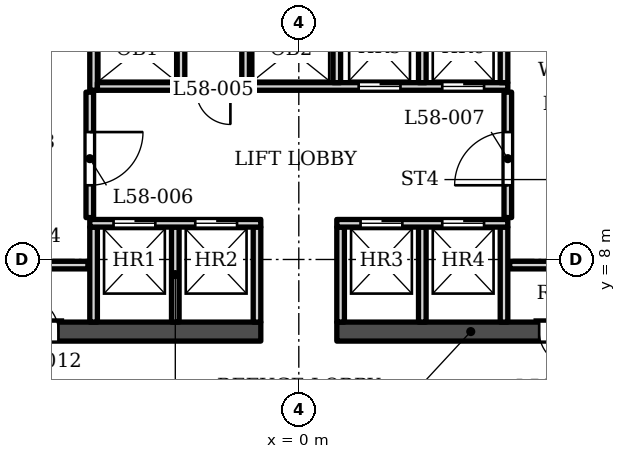
"""IFC4 building model, lengths in metres.
Left out: names, types, materials, properties, quantities, classifications, styles, units other than length and angle.
Written with IfcOpenShell. Run it as: python <this file> out.ifc"""

import sys

from ifc_helpers import new_model, si_unit, direction, frame, frame_2d, origin, place, context, subcontext, project, spatial, rectangle, extrude, element, fill, save


model = new_model("IFC4")
c1 = context("Model", 3, precision=1e-05, world=origin(), true_north=direction((0.0, 1.0)))
c2 = subcontext(c1, "Body", "Model", "MODEL_VIEW")
j1 = project(units=[si_unit("LENGTHUNIT", "METRE"), si_unit("PLANEANGLEUNIT", "RADIAN")], contexts=[c1])
p1 = place(None, origin())
s1 = spatial("IfcSite", under=j1, at=p1, CompositionType="ELEMENT")
p2 = place(p1, origin())
s2 = spatial("IfcBuilding", under=s1, at=p2, CompositionType="ELEMENT")
p3 = place(p2, frame((0.0, 0.0, 243.2)))
s3 = spatial("IfcBuildingStorey", under=s2, at=p3, CompositionType="ELEMENT", Elevation=243.2)
p4 = place(p3, frame((-8.05, 6.103, 0.0), z_axis=(0.0, 0.0, 1.0), x_axis=(1.0, 0.0, 0.0)))
e1 = element("IfcWall", 1, at=p4, inside=s3, PredefinedType="SHEAR", context=c2, shape_type="SweptSolid", body=[
    extrude(rectangle(XDim=7.05, YDim=0.5, at=frame_2d((3.525, 0.0))), origin(), (0.0, 0.0, 1.0), 5.0),
])
p5 = place(p4, frame((0.825, 0.0, 0.0)))
e2 = element("IfcOpeningElement", 2, at=p5, cuts=e1, PredefinedType="OPENING", context=c2, shape_type="SweptSolid", body=[
    extrude(rectangle(XDim=0.9, YDim=2.1, at=frame_2d((0.45, 1.05))), frame((0.0, 0.26, 0.0), z_axis=(0.0, -1.0, 0.0), x_axis=(1.0, 0.0, 0.0)), (0.0, 0.0, 1.0), 0.52),
])
p6 = place(p3, frame((1.0, 6.103, 0.0), z_axis=(0.0, 0.0, 1.0), x_axis=(1.0, 0.0, 0.0)))
e3 = element("IfcWall", 3, at=p6, inside=s3, PredefinedType="SHEAR", context=c2, shape_type="SweptSolid", body=[
    extrude(rectangle(XDim=7.05, YDim=0.5, at=frame_2d((3.525, 0.0))), origin(), (0.0, 0.0, 1.0), 5.0),
])
p7 = place(p6, frame((5.325, 0.0, 0.0)))
e4 = element("IfcOpeningElement", 4, at=p7, cuts=e3, PredefinedType="OPENING", context=c2, shape_type="SweptSolid", body=[
    extrude(rectangle(XDim=0.9, YDim=2.1, at=frame_2d((0.45, 1.05))), frame((0.0, 0.26, 0.0), z_axis=(0.0, -1.0, 0.0), x_axis=(1.0, 0.0, 0.0)), (0.0, 0.0, 1.0), 0.52),
])
for number, where, z_axis, x_axis in (
    (5, (-5.4, 6.353, 0.0), (0.0, 0.0, 1.0), (0.0, 1.0, 0.0)),
    (6, (-3.25, 6.353, 0.0), (0.0, 0.0, 1.0), (0.0, 1.0, 0.0)),
    (7, (-1.1, 6.353, 0.0), (0.0, 0.0, 1.0), (0.0, 1.0, 0.0)),
    (8, (1.1, 6.353, 0.0), (0.0, 0.0, 1.0), (0.0, 1.0, 0.0)),
    (9, (3.25, 6.353, 0.0), (0.0, 0.0, 1.0), (0.0, 1.0, 0.0)),
    (10, (5.4, 6.353, 0.0), (0.0, 0.0, 1.0), (0.0, 1.0, 0.0)),
    (11, (-8.05, 7.853, 0.0), (0.0, 0.0, 1.0), (1.0, 0.0, 0.0)),
    (12, (5.55, 7.853, 0.0), (0.0, 0.0, 1.0), (1.0, 0.0, 0.0)),
):
    element("IfcWall", number, at=place(p3, frame(where, z_axis=z_axis, x_axis=x_axis)), inside=s3, PredefinedType="SOLIDWALL", context=c2, shape_type="SweptSolid", body=[
        extrude(rectangle(XDim=2.5, YDim=0.2, at=frame_2d((1.25, 0.0))), origin(), (0.0, 0.0, 1.0), 4.83),
    ])
p8 = place(p3, frame((-5.5, 8.953, 0.0), z_axis=(0.0, 0.0, 1.0), x_axis=(1.0, 0.0, 0.0)))
e13 = element("IfcWall", 13, at=p8, inside=s3, PredefinedType="SOLIDWALL", context=c2, shape_type="SweptSolid", body=[
    extrude(rectangle(XDim=4.5, YDim=0.2, at=frame_2d((2.25, 0.0))), origin(), (0.0, 0.0, 1.0), 4.83),
])
p9 = place(p8, frame((0.625, 0.0, 0.0)))
e14 = element("IfcOpeningElement", 14, at=p9, cuts=e13, PredefinedType="OPENING", context=c2, shape_type="SweptSolid", body=[
    extrude(rectangle(XDim=1.1, YDim=2.1, at=frame_2d((0.55, 1.05))), frame((0.0, 0.11, 0.0), z_axis=(0.0, -1.0, 0.0), x_axis=(1.0, 0.0, 0.0)), (0.0, 0.0, 1.0), 0.22),
])
p10 = place(p8, frame((2.775, 0.0, 0.0)))
e15 = element("IfcOpeningElement", 15, at=p10, cuts=e13, PredefinedType="OPENING", context=c2, shape_type="SweptSolid", body=[
    extrude(rectangle(XDim=1.1, YDim=2.1, at=frame_2d((0.55, 1.05))), frame((0.0, 0.11, 0.0), z_axis=(0.0, -1.0, 0.0), x_axis=(1.0, 0.0, 0.0)), (0.0, 0.0, 1.0), 0.22),
])
p11 = place(p3, frame((1.0, 8.953, 0.0), z_axis=(0.0, 0.0, 1.0), x_axis=(1.0, 0.0, 0.0)))
e16 = element("IfcWall", 16, at=p11, inside=s3, PredefinedType="SOLIDWALL", context=c2, shape_type="SweptSolid", body=[
    extrude(rectangle(XDim=4.5, YDim=0.2, at=frame_2d((2.25, 0.0))), origin(), (0.0, 0.0, 1.0), 4.83),
])
p12 = place(p11, frame((0.625, 0.0, 0.0)))
e17 = element("IfcOpeningElement", 17, at=p12, cuts=e16, PredefinedType="OPENING", context=c2, shape_type="SweptSolid", body=[
    extrude(rectangle(XDim=1.1, YDim=2.1, at=frame_2d((0.55, 1.05))), frame((0.0, 0.11, 0.0), z_axis=(0.0, -1.0, 0.0), x_axis=(1.0, 0.0, 0.0)), (0.0, 0.0, 1.0), 0.22),
])
p13 = place(p11, frame((2.775, 0.0, 0.0)))
e18 = element("IfcOpeningElement", 18, at=p13, cuts=e16, PredefinedType="OPENING", context=c2, shape_type="SweptSolid", body=[
    extrude(rectangle(XDim=1.1, YDim=2.1, at=frame_2d((0.55, 1.05))), frame((0.0, 0.11, 0.0), z_axis=(0.0, -1.0, 0.0), x_axis=(1.0, 0.0, 0.0)), (0.0, 0.0, 1.0), 0.22),
])
p14 = place(p3, frame((-5.5, 9.103, 0.0), z_axis=(0.0, 0.0, 1.0), x_axis=(0.0, 1.0, 0.0)))
e19 = element("IfcWall", 19, at=p14, inside=s3, PredefinedType="SOLIDWALL", context=c2, shape_type="SweptSolid", body=[
    extrude(rectangle(XDim=3.3, YDim=0.2, at=frame_2d((1.65, 0.0))), origin(), (0.0, 0.0, 1.0), 4.83),
])
p15 = place(p14, frame((0.85, 0.0, 0.0)))
e20 = element("IfcOpeningElement", 20, at=p15, cuts=e19, PredefinedType="OPENING", context=c2, shape_type="SweptSolid", body=[
    extrude(rectangle(XDim=1.4, YDim=2.1, at=frame_2d((0.7, 1.05))), frame((0.0, 0.11, 0.0), z_axis=(0.0, -1.0, 0.0), x_axis=(1.0, 0.0, 0.0)), (0.0, 0.0, 1.0), 0.22),
])
p16 = place(p3, frame((5.5, 9.103, 0.0), z_axis=(0.0, 0.0, 1.0), x_axis=(0.0, 1.0, 0.0)))
e21 = element("IfcWall", 21, at=p16, inside=s3, PredefinedType="SOLIDWALL", context=c2, shape_type="SweptSolid", body=[
    extrude(rectangle(XDim=3.3, YDim=0.2, at=frame_2d((1.65, 0.0))), origin(), (0.0, 0.0, 1.0), 4.83),
])
p17 = place(p16, frame((0.85, 0.0, 0.0)))
e22 = element("IfcOpeningElement", 22, at=p17, cuts=e21, PredefinedType="OPENING", context=c2, shape_type="SweptSolid", body=[
    extrude(rectangle(XDim=1.4, YDim=2.1, at=frame_2d((0.7, 1.05))), frame((0.0, 0.11, 0.0), z_axis=(0.0, -1.0, 0.0), x_axis=(1.0, 0.0, 0.0)), (0.0, 0.0, 1.0), 0.22),
])
p18 = place(p3, frame((-2.95, 12.453, 0.0), z_axis=(0.0, 0.0, 1.0), x_axis=(1.0, 0.0, 0.0)))
e23 = element("IfcWall", 23, at=p18, inside=s3, PredefinedType="SOLIDWALL", context=c2, shape_type="SweptSolid", body=[
    extrude(rectangle(XDim=1.4, YDim=0.2, at=frame_2d((0.7, 0.0))), origin(), (0.0, 0.0, 1.0), 4.83),
])
p19 = place(p18, frame((0.25, 0.0, 0.0)))
e24 = element("IfcOpeningElement", 24, at=p19, cuts=e23, PredefinedType="OPENING", context=c2, shape_type="SweptSolid", body=[
    extrude(rectangle(XDim=0.9, YDim=2.1, at=frame_2d((0.45, 1.05))), frame((0.0, 0.11, 0.0), z_axis=(0.0, -1.0, 0.0), x_axis=(1.0, 0.0, 0.0)), (0.0, 0.0, 1.0), 0.22),
])
p20 = place(p3, frame((-5.4, 12.453, 0.0), z_axis=(0.0, 0.0, 1.0), x_axis=(0.0, 1.0, 0.0)))
e25 = element("IfcWall", 25, at=p20, inside=s3, PredefinedType="SOLIDWALL", context=c2, shape_type="SweptSolid", body=[
    extrude(rectangle(XDim=3.0, YDim=0.2, at=frame_2d((1.5, 0.0))), origin(), (0.0, 0.0, 1.0), 4.83),
])
p21 = place(p3, frame((-5.3, 12.552, 0.0), z_axis=(0.0, 0.0, 1.0), x_axis=(1.0, 0.0, 0.0)))
e26 = element("IfcWall", 26, at=p21, inside=s3, PredefinedType="SOLIDWALL", context=c2, shape_type="SweptSolid", body=[
    extrude(rectangle(XDim=2.1, YDim=0.2, at=frame_2d((1.05, 0.0))), origin(), (0.0, 0.0, 1.0), 4.83),
])
p22 = place(p3, frame((-3.1, 12.453, 0.0), z_axis=(0.0, 0.0, 1.0), x_axis=(0.0, 1.0, 0.0)))
e27 = element("IfcWall", 27, at=p22, inside=s3, PredefinedType="SOLIDWALL", context=c2, shape_type="SweptSolid", body=[
    extrude(rectangle(XDim=3.0, YDim=0.2, at=frame_2d((1.5, 0.0))), origin(), (0.0, 0.0, 1.0), 4.83),
])
p23 = place(p3, frame((-1.5, 12.552, 0.0), z_axis=(0.0, 0.0, 1.0), x_axis=(1.0, 0.0, 0.0)))
e28 = element("IfcWall", 28, at=p23, inside=s3, PredefinedType="SOLIDWALL", context=c2, shape_type="SweptSolid", body=[
    extrude(rectangle(XDim=7.0, YDim=0.2, at=frame_2d((3.5, 0.0))), origin(), (0.0, 0.0, 1.0), 4.83),
])
p24 = place(p23, frame((3.075, 0.0, 0.0)))
e29 = element("IfcOpeningElement", 29, at=p24, cuts=e28, PredefinedType="OPENING", context=c2, shape_type="SweptSolid", body=[
    extrude(rectangle(XDim=1.1, YDim=2.1, at=frame_2d((0.55, 1.05))), frame((0.0, 0.11, 0.0), z_axis=(0.0, -1.0, 0.0), x_axis=(1.0, 0.0, 0.0)), (0.0, 0.0, 1.0), 0.22),
])
p25 = place(p23, frame((5.275, 0.0, 0.0)))
e30 = element("IfcOpeningElement", 30, at=p25, cuts=e28, PredefinedType="OPENING", context=c2, shape_type="SweptSolid", body=[
    extrude(rectangle(XDim=1.1, YDim=2.1, at=frame_2d((0.55, 1.05))), frame((0.0, 0.11, 0.0), z_axis=(0.0, -1.0, 0.0), x_axis=(1.0, 0.0, 0.0)), (0.0, 0.0, 1.0), 0.22),
])
for number, where, z_axis, x_axis in (
    (31, (-1.4, 12.653, 0.0), (0.0, 0.0, 1.0), (0.0, 1.0, 0.0)),
    (32, (1.0, 12.653, 0.0), (0.0, 0.0, 1.0), (0.0, 1.0, 0.0)),
    (33, (3.25, 12.653, 0.0), (0.0, 0.0, 1.0), (0.0, 1.0, 0.0)),
):
    element("IfcWall", number, at=place(p3, frame(where, z_axis=z_axis, x_axis=x_axis)), inside=s3, PredefinedType="SOLIDWALL", context=c2, shape_type="SweptSolid", body=[
        extrude(rectangle(XDim=2.6, YDim=0.2, at=frame_2d((1.3, 0.0))), origin(), (0.0, 0.0, 1.0), 4.83),
    ])
p26 = place(p3, frame((5.4, 12.653, 0.0), z_axis=(0.0, 0.0, 1.0), x_axis=(0.0, 1.0, 0.0)))
e34 = element("IfcWall", 34, at=p26, inside=s3, PredefinedType="SOLIDWALL", context=c2, shape_type="SweptSolid", body=[
    extrude(rectangle(XDim=1.6, YDim=0.2, at=frame_2d((0.8, 0.0))), origin(), (0.0, 0.0, 1.0), 4.83),
])
p27 = place(p9, origin())
e35 = element("IfcDoor", 35, at=p27, inside=s3, OperationType="DOUBLE_DOOR_SLIDING", PredefinedType="DOOR", context=c2, shape_type="SweptSolid", body=[
    extrude(rectangle(XDim=1.1, YDim=2.1, at=frame_2d((0.55, 1.05))), frame((0.0, 0.025, 0.0), z_axis=(0.0, -1.0, 0.0), x_axis=(1.0, 0.0, 0.0)), (0.0, 0.0, 1.0), 0.05),
])
fill(e14, e35)
p28 = place(p10, origin())
e36 = element("IfcDoor", 36, at=p28, inside=s3, OperationType="DOUBLE_DOOR_SLIDING", PredefinedType="DOOR", context=c2, shape_type="SweptSolid", body=[
    extrude(rectangle(XDim=1.1, YDim=2.1, at=frame_2d((0.55, 1.05))), frame((0.0, 0.025, 0.0), z_axis=(0.0, -1.0, 0.0), x_axis=(1.0, 0.0, 0.0)), (0.0, 0.0, 1.0), 0.05),
])
fill(e15, e36)
p29 = place(p12, origin())
e37 = element("IfcDoor", 37, at=p29, inside=s3, OperationType="DOUBLE_DOOR_SLIDING", PredefinedType="DOOR", context=c2, shape_type="SweptSolid", body=[
    extrude(rectangle(XDim=1.1, YDim=2.1, at=frame_2d((0.55, 1.05))), frame((0.0, 0.025, 0.0), z_axis=(0.0, -1.0, 0.0), x_axis=(1.0, 0.0, 0.0)), (0.0, 0.0, 1.0), 0.05),
])
fill(e17, e37)
p30 = place(p13, origin())
e38 = element("IfcDoor", 38, at=p30, inside=s3, OperationType="DOUBLE_DOOR_SLIDING", PredefinedType="DOOR", context=c2, shape_type="SweptSolid", body=[
    extrude(rectangle(XDim=1.1, YDim=2.1, at=frame_2d((0.55, 1.05))), frame((0.0, 0.025, 0.0), z_axis=(0.0, -1.0, 0.0), x_axis=(1.0, 0.0, 0.0)), (0.0, 0.0, 1.0), 0.05),
])
fill(e18, e38)
p31 = place(p24, origin())
e39 = element("IfcDoor", 39, at=p31, inside=s3, OperationType="DOUBLE_DOOR_SLIDING", PredefinedType="DOOR", context=c2, shape_type="SweptSolid", body=[
    extrude(rectangle(XDim=1.1, YDim=2.1, at=frame_2d((0.55, 1.05))), frame((0.0, 0.025, 0.0), z_axis=(0.0, -1.0, 0.0), x_axis=(1.0, 0.0, 0.0)), (0.0, 0.0, 1.0), 0.05),
])
fill(e29, e39)
p32 = place(p25, origin())
e40 = element("IfcDoor", 40, at=p32, inside=s3, OperationType="DOUBLE_DOOR_SLIDING", PredefinedType="DOOR", context=c2, shape_type="SweptSolid", body=[
    extrude(rectangle(XDim=1.1, YDim=2.1, at=frame_2d((0.55, 1.05))), frame((0.0, 0.025, 0.0), z_axis=(0.0, -1.0, 0.0), x_axis=(1.0, 0.0, 0.0)), (0.0, 0.0, 1.0), 0.05),
])
fill(e30, e40)
p33 = place(p19, origin())
e41 = element("IfcDoor", 41, at=p33, inside=s3, OperationType="SINGLE_SWING_RIGHT", PredefinedType="DOOR", context=c2, shape_type="SweptSolid", body=[
    extrude(rectangle(XDim=0.9, YDim=2.1, at=frame_2d((0.45, 1.05))), frame((0.0, 0.025, 0.0), z_axis=(0.0, -1.0, 0.0), x_axis=(1.0, 0.0, 0.0)), (0.0, 0.0, 1.0), 0.05),
])
fill(e24, e41)
p34 = place(p15, origin())
e42 = element("IfcDoor", 42, at=p34, inside=s3, OperationType="SINGLE_SWING_RIGHT", PredefinedType="DOOR", context=c2, shape_type="SweptSolid", body=[
    extrude(rectangle(XDim=1.4, YDim=2.1, at=frame_2d((0.7, 1.05))), frame((0.0, 0.025, 0.0), z_axis=(0.0, -1.0, 0.0), x_axis=(1.0, 0.0, 0.0)), (0.0, 0.0, 1.0), 0.05),
])
fill(e20, e42)
p35 = place(p17, origin())
e43 = element("IfcDoor", 43, at=p35, inside=s3, OperationType="SINGLE_SWING_LEFT", PredefinedType="DOOR", context=c2, shape_type="SweptSolid", body=[
    extrude(rectangle(XDim=1.4, YDim=2.1, at=frame_2d((0.7, 1.05))), frame((0.0, 0.025, 0.0), z_axis=(0.0, -1.0, 0.0), x_axis=(1.0, 0.0, 0.0)), (0.0, 0.0, 1.0), 0.05),
])
fill(e22, e43)
p36 = place(p5, origin())
e44 = element("IfcDoor", 44, at=p36, inside=s3, OperationType="SINGLE_SWING_LEFT", PredefinedType="DOOR", context=c2, shape_type="SweptSolid", body=[
    extrude(rectangle(XDim=0.9, YDim=2.1, at=frame_2d((0.45, 1.05))), frame((0.0, 0.025, 0.0), z_axis=(0.0, -1.0, 0.0), x_axis=(1.0, 0.0, 0.0)), (0.0, 0.0, 1.0), 0.05),
])
fill(e2, e44)
p37 = place(p7, origin())
e45 = element("IfcDoor", 45, at=p37, inside=s3, OperationType="SINGLE_SWING_RIGHT", PredefinedType="DOOR", context=c2, shape_type="SweptSolid", body=[
    extrude(rectangle(XDim=0.9, YDim=2.1, at=frame_2d((0.45, 1.05))), frame((0.0, 0.025, 0.0), z_axis=(0.0, -1.0, 0.0), x_axis=(1.0, 0.0, 0.0)), (0.0, 0.0, 1.0), 0.05),
])
fill(e4, e45)
save(model, sys.argv[1])
